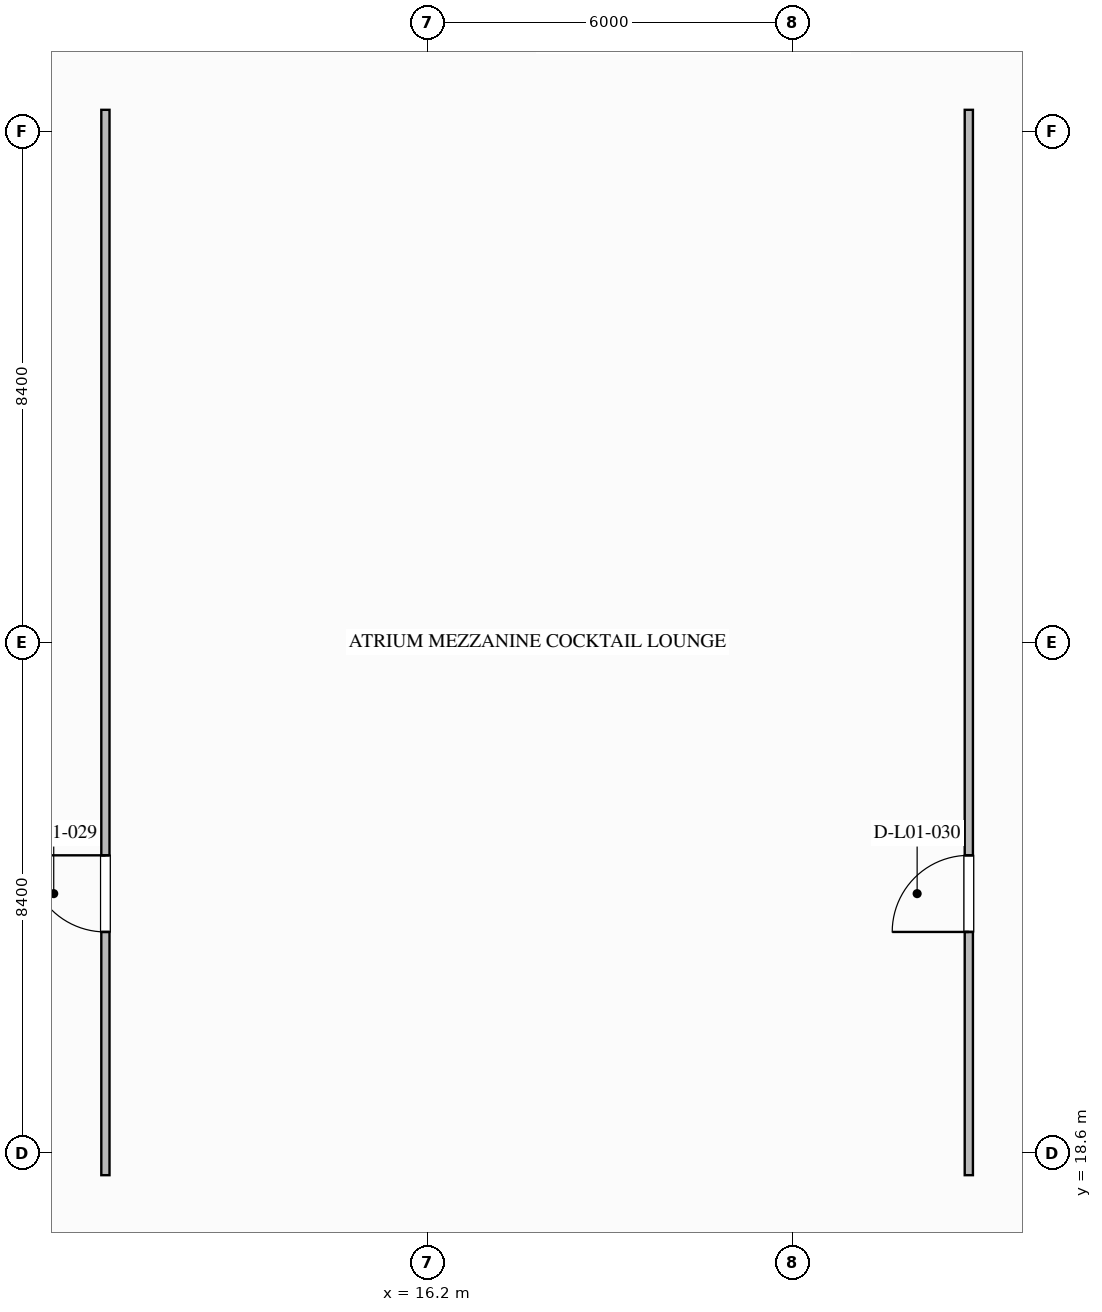
"""IFC4 building model, lengths in metres.
Left out: names, types, materials, properties, quantities, classifications, styles, units other than length and angle.
Written with IfcOpenShell. Run it as: python <this file> out.ifc"""

import sys

from ifc_helpers import new_model, si_unit, direction, frame, frame_2d, origin, place, context, subcontext, project, spatial, rectangle, extrude, element, fill, save


model = new_model("IFC4")
c1 = context("Model", 3, precision=1e-05, world=origin(), true_north=direction((0.0, 1.0)))
c2 = subcontext(c1, "Body", "Model", "MODEL_VIEW")
j1 = project(units=[si_unit("LENGTHUNIT", "METRE"), si_unit("PLANEANGLEUNIT", "RADIAN")], contexts=[c1])
p1 = place(None, origin())
s1 = spatial("IfcSite", under=j1, at=p1, CompositionType="ELEMENT")
p2 = place(p1, origin())
s2 = spatial("IfcBuilding", under=s1, at=p2, CompositionType="ELEMENT")
p3 = place(p2, frame((0.0, 0.0, 5.6)))
s3 = spatial("IfcBuildingStorey", under=s2, at=p3, CompositionType="ELEMENT", Elevation=5.6)
p4 = place(p3, frame((10.9, 18.24, 0.0), z_axis=(0.0, 0.0, 1.0), x_axis=(0.0, 1.0, 0.0)))
e1 = element("IfcWall", 1, at=p4, inside=s3, PredefinedType="PARTITIONING", context=c2, shape_type="SweptSolid", body=[
    extrude(rectangle(XDim=17.52, YDim=0.135, at=frame_2d((8.76, 0.0))), origin(), (0.0, 0.0, 1.0), 4.85),
])
p5 = place(p4, frame((4.0, 0.0, 0.0)))
e2 = element("IfcOpeningElement", 2, at=p5, cuts=e1, PredefinedType="OPENING", context=c2, shape_type="SweptSolid", body=[
    extrude(rectangle(XDim=1.26, YDim=2.2, at=frame_2d((0.63, 1.1))), frame((0.0, 0.077, 0.0), z_axis=(0.0, -1.0, 0.0), x_axis=(1.0, 0.0, 0.0)), (0.0, 0.0, 1.0), 0.155),
])
p6 = place(p3, frame((25.1, 18.24, 0.0), z_axis=(0.0, 0.0, 1.0), x_axis=(0.0, 1.0, 0.0)))
e3 = element("IfcWall", 3, at=p6, inside=s3, PredefinedType="PARTITIONING", context=c2, shape_type="SweptSolid", body=[
    extrude(rectangle(XDim=17.52, YDim=0.135, at=frame_2d((8.76, 0.0))), origin(), (0.0, 0.0, 1.0), 4.85),
])
p7 = place(p6, frame((4.0, 0.0, 0.0)))
e4 = element("IfcOpeningElement", 4, at=p7, cuts=e3, PredefinedType="OPENING", context=c2, shape_type="SweptSolid", body=[
    extrude(rectangle(XDim=1.26, YDim=2.2, at=frame_2d((0.63, 1.1))), frame((0.0, 0.077, 0.0), z_axis=(0.0, -1.0, 0.0), x_axis=(1.0, 0.0, 0.0)), (0.0, 0.0, 1.0), 0.155),
])
p8 = place(p5, origin())
e5 = element("IfcDoor", 5, at=p8, inside=s3, OperationType="SINGLE_SWING_RIGHT", PredefinedType="DOOR", context=c2, shape_type="SweptSolid", body=[
    extrude(rectangle(XDim=1.26, YDim=2.2, at=frame_2d((0.63, 1.1))), frame((0.0, 0.025, 0.0), z_axis=(0.0, -1.0, 0.0), x_axis=(1.0, 0.0, 0.0)), (0.0, 0.0, 1.0), 0.05),
])
fill(e2, e5)
p9 = place(p7, origin())
e6 = element("IfcDoor", 6, at=p9, inside=s3, OperationType="SINGLE_SWING_LEFT", PredefinedType="DOOR", context=c2, shape_type="SweptSolid", body=[
    extrude(rectangle(XDim=1.26, YDim=2.2, at=frame_2d((0.63, 1.1))), frame((0.0, 0.025, 0.0), z_axis=(0.0, -1.0, 0.0), x_axis=(1.0, 0.0, 0.0)), (0.0, 0.0, 1.0), 0.05),
])
fill(e4, e6)
save(model, sys.argv[1])
